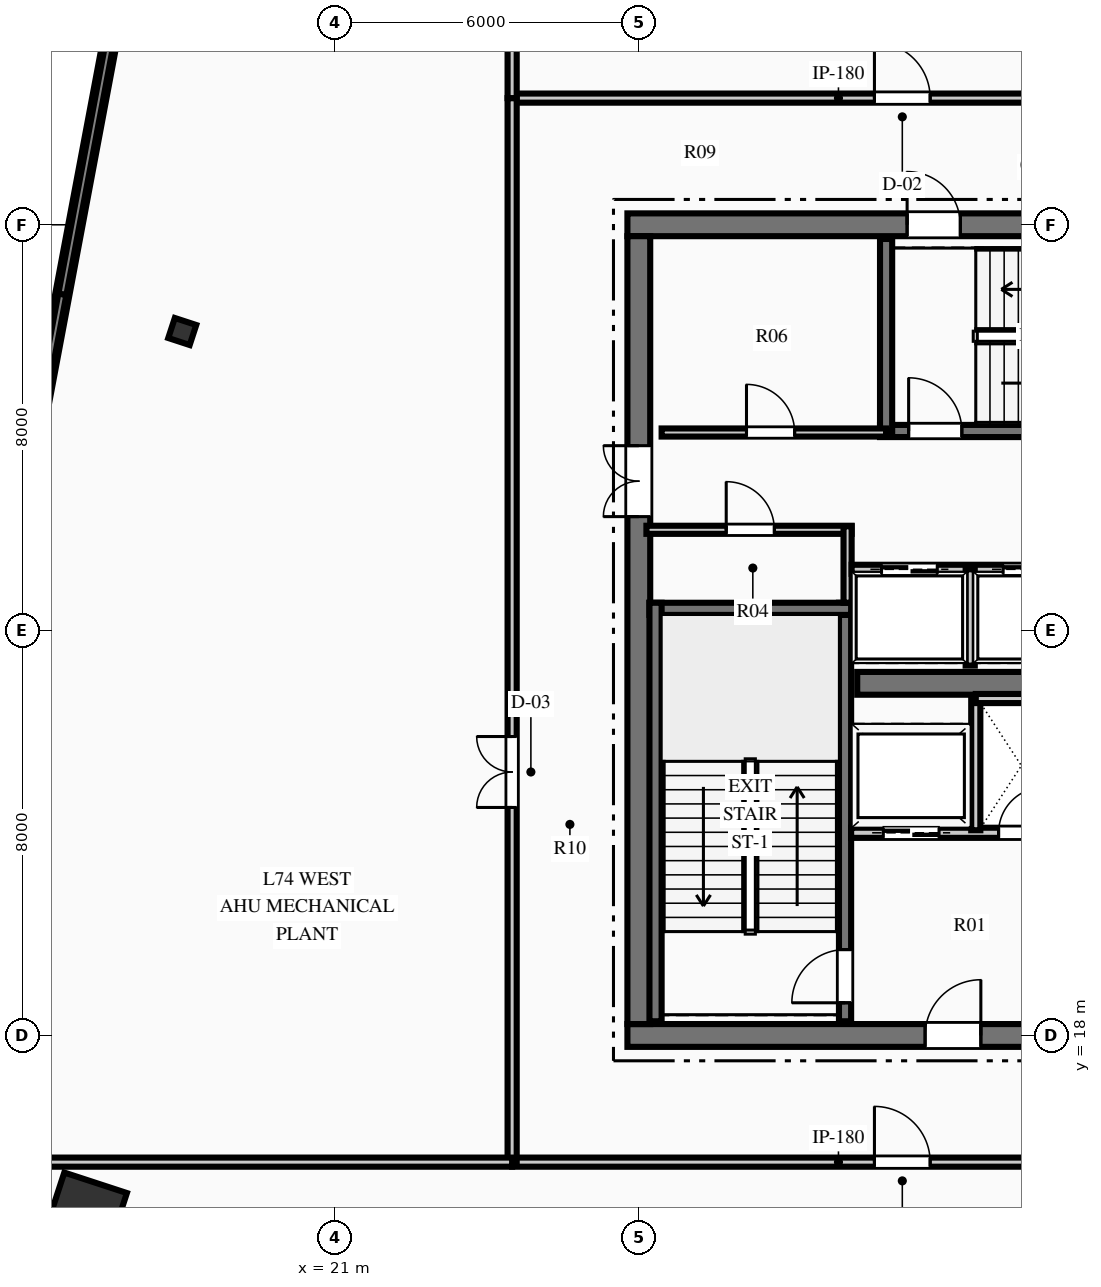
"""IFC4 building model, lengths in metres.
Left out: names, types, materials, properties, quantities, classifications, styles, units other than length and angle.
Written with IfcOpenShell. Run it as: python <this file> out.ifc"""

import sys

from ifc_helpers import new_model, si_unit, direction, frame, frame_2d, origin, origin_2d, place, context, subcontext, project, spatial, rectangle, hollow_rectangle, i_section, extrude, element, fill, save


model = new_model("IFC4")
c1 = context("Model", 3, precision=1e-05, world=origin(), true_north=direction((0.0, 1.0)))
c2 = subcontext(c1, "Body", "Model", "MODEL_VIEW")
j1 = project(units=[si_unit("LENGTHUNIT", "METRE"), si_unit("PLANEANGLEUNIT", "RADIAN")], contexts=[c1])
p1 = place(None, origin())
s1 = spatial("IfcSite", under=j1, at=p1, CompositionType="ELEMENT")
p2 = place(p1, origin())
s2 = spatial("IfcBuilding", under=s1, at=p2, CompositionType="ELEMENT")
p3 = place(p2, frame((0.0, 0.0, 293.7)))
s3 = spatial("IfcBuildingStorey", under=s2, at=p3, CompositionType="ELEMENT", Elevation=293.7)
p4 = place(p3, frame((26.775, 18.0, 0.0), z_axis=(0.0, 0.0, 1.0), x_axis=(1.0, 0.0, 0.0)))
e1 = element("IfcWall", 1, at=p4, inside=s3, PredefinedType="SHEAR", context=c2, shape_type="SweptSolid", body=[
    extrude(rectangle(XDim=18.45, YDim=0.45, at=frame_2d((9.225, 0.0))), origin(), (0.0, 0.0, 1.0), 4.5),
])
p5 = place(p4, frame((5.875, 0.0, 0.0)))
e2 = element("IfcOpeningElement", 2, at=p5, cuts=e1, PredefinedType="OPENING", context=c2, shape_type="SweptSolid", body=[
    extrude(rectangle(XDim=1.1, YDim=2.15, at=frame_2d((0.55, 1.075))), frame((0.0, 0.235, 0.0), z_axis=(0.0, -1.0, 0.0), x_axis=(1.0, 0.0, 0.0)), (0.0, 0.0, 1.0), 0.47),
])
p6 = place(p4, frame((11.475, 0.0, 0.0)))
e3 = element("IfcOpeningElement", 3, at=p6, cuts=e1, PredefinedType="OPENING", context=c2, shape_type="SweptSolid", body=[
    extrude(rectangle(XDim=1.1, YDim=2.15, at=frame_2d((0.55, 1.075))), frame((0.0, 0.235, 0.0), z_axis=(0.0, -1.0, 0.0), x_axis=(1.0, 0.0, 0.0)), (0.0, 0.0, 1.0), 0.47),
])
p7 = place(p3, frame((26.775, 34.0, 0.0), z_axis=(0.0, 0.0, 1.0), x_axis=(1.0, 0.0, 0.0)))
e4 = element("IfcWall", 4, at=p7, inside=s3, PredefinedType="SHEAR", context=c2, shape_type="SweptSolid", body=[
    extrude(rectangle(XDim=18.45, YDim=0.45, at=frame_2d((9.225, 0.0))), origin(), (0.0, 0.0, 1.0), 4.5),
])
p8 = place(p7, frame((5.52, 0.0, 0.0)))
e5 = element("IfcOpeningElement", 5, at=p8, cuts=e4, PredefinedType="OPENING", context=c2, shape_type="SweptSolid", body=[
    extrude(rectangle(XDim=1.05, YDim=2.15, at=frame_2d((0.525, 1.075))), frame((0.0, 0.235, 0.0), z_axis=(0.0, -1.0, 0.0), x_axis=(1.0, 0.0, 0.0)), (0.0, 0.0, 1.0), 0.47),
])
p9 = place(p3, frame((27.0, 18.225, 0.0), z_axis=(0.0, 0.0, 1.0), x_axis=(0.0, 1.0, 0.0)))
e6 = element("IfcWall", 6, at=p9, inside=s3, PredefinedType="SHEAR", context=c2, shape_type="SweptSolid", body=[
    extrude(rectangle(XDim=15.55, YDim=0.45, at=frame_2d((7.775, 0.0))), origin(), (0.0, 0.0, 1.0), 4.5),
])
p10 = place(p9, frame((10.015, 0.0, 0.0)))
e7 = element("IfcOpeningElement", 7, at=p10, cuts=e6, PredefinedType="OPENING", context=c2, shape_type="SweptSolid", body=[
    extrude(rectangle(XDim=1.4, YDim=2.2, at=frame_2d((0.7, 1.1))), frame((0.0, 0.235, 0.0), z_axis=(0.0, -1.0, 0.0), x_axis=(1.0, 0.0, 0.0)), (0.0, 0.0, 1.0), 0.47),
])
p11 = place(p3, frame((31.31, 24.95, 0.0), z_axis=(0.0, 0.0, 1.0), x_axis=(1.0, 0.0, 0.0)))
e8 = element("IfcWall", 8, at=p11, inside=s3, PredefinedType="SHEAR", context=c2, shape_type="SweptSolid", body=[
    extrude(rectangle(XDim=9.38, YDim=0.45, at=frame_2d((4.69, 0.0))), origin(), (0.0, 0.0, 1.0), 4.5),
])
p12 = place(p3, frame((31.07, 18.28, 0.0), z_axis=(0.0, 0.0, 1.0), x_axis=(0.0, 1.0, 0.0)))
e9 = element("IfcWall", 9, at=p12, inside=s3, PredefinedType="SHEAR", context=c2, shape_type="SweptSolid", body=[
    extrude(rectangle(XDim=8.26, YDim=0.24, at=frame_2d((4.13, 0.0))), origin(), (0.0, 0.0, 1.0), 4.5),
])
p13 = place(p12, frame((0.365, 0.0, 0.0)))
e10 = element("IfcOpeningElement", 10, at=p13, cuts=e9, PredefinedType="OPENING", context=c2, shape_type="SweptSolid", body=[
    extrude(rectangle(XDim=1.05, YDim=2.15, at=frame_2d((0.525, 1.075))), frame((0.0, 0.13, 0.0), z_axis=(0.0, -1.0, 0.0), x_axis=(1.0, 0.0, 0.0)), (0.0, 0.0, 1.0), 0.26),
])
p14 = place(p3, frame((27.21, 26.42, 0.0), z_axis=(0.0, 0.0, 1.0), x_axis=(1.0, 0.0, 0.0)))
e11 = element("IfcWall", 11, at=p14, inside=s3, PredefinedType="SHEAR", context=c2, shape_type="SweptSolid", body=[
    extrude(rectangle(XDim=3.98, YDim=0.24, at=frame_2d((1.99, 0.0))), origin(), (0.0, 0.0, 1.0), 4.5),
])
p15 = place(p3, frame((27.33, 18.28, 0.0), z_axis=(0.0, 0.0, 1.0), x_axis=(0.0, 1.0, 0.0)))
e12 = element("IfcWall", 12, at=p15, inside=s3, PredefinedType="SHEAR", context=c2, shape_type="SweptSolid", body=[
    extrude(rectangle(XDim=8.26, YDim=0.24, at=frame_2d((4.13, 0.0))), origin(), (0.0, 0.0, 1.0), 4.5),
])
p16 = place(p3, frame((31.76, 29.93, 0.0), z_axis=(0.0, 0.0, 1.0), x_axis=(1.0, 0.0, 0.0)))
e13 = element("IfcWall", 13, at=p16, inside=s3, PredefinedType="SHEAR", context=c2, shape_type="SweptSolid", body=[
    extrude(rectangle(XDim=8.38, YDim=0.24, at=frame_2d((4.19, 0.0))), origin(), (0.0, 0.0, 1.0), 4.5),
])
p17 = place(p16, frame((0.565, 0.0, 0.0)))
e14 = element("IfcOpeningElement", 14, at=p17, cuts=e13, PredefinedType="OPENING", context=c2, shape_type="SweptSolid", body=[
    extrude(rectangle(XDim=1.05, YDim=2.15, at=frame_2d((0.525, 1.075))), frame((0.0, 0.13, 0.0), z_axis=(0.0, -1.0, 0.0), x_axis=(1.0, 0.0, 0.0)), (0.0, 0.0, 1.0), 0.26),
])
p18 = place(p3, frame((31.88, 29.93, 0.0), z_axis=(0.0, 0.0, 1.0), x_axis=(0.0, 1.0, 0.0)))
e15 = element("IfcWall", 15, at=p18, inside=s3, PredefinedType="SHEAR", context=c2, shape_type="SweptSolid", body=[
    extrude(rectangle(XDim=3.79, YDim=0.24, at=frame_2d((1.895, 0.0))), origin(), (0.0, 0.0, 1.0), 4.5),
])
p19 = place(p3, frame((16.077, 14.475, 0.0), z_axis=(0.0, 0.0, 1.0), x_axis=(0.311008203279, 0.950407227189, 0.0)))
e16 = element("IfcColumn", 16, at=p19, inside=s3, PredefinedType="COLUMN", context=c2, shape_type="SweptSolid", body=[
    extrude(hollow_rectangle(XDim=1.3, YDim=1.3, WallThickness=0.06, at=origin_2d()), origin(), (0.0, 0.0, 1.0), 4.5),
])
p20 = place(p3, frame((17.99, 31.894, 0.0), z_axis=(0.0, 0.0, 1.0), x_axis=(0.311008203279, 0.950407227189, 0.0)))
e17 = element("IfcColumn", 17, at=p20, inside=s3, PredefinedType="COLUMN", context=c2, shape_type="SweptSolid", body=[
    extrude(i_section(OverallWidth=0.416, OverallDepth=0.445, WebThickness=0.039, FlangeThickness=0.063, at=origin_2d()), origin(), (0.0, 0.0, 1.0), 4.5),
])
p21 = place(p3, frame((15.116, 29.927, 0.0), z_axis=(0.0, 0.0, 1.0), x_axis=(0.184798495251, 0.982776432437, 0.0)))
e18 = element("IfcWall", 18, at=p21, inside=s3, PredefinedType="STANDARD", context=c2, shape_type="SweptSolid", body=[
    extrude(rectangle(XDim=19.25, YDim=0.28, at=frame_2d((9.625, 0.0))), origin(), (0.0, 0.0, 1.0), 1.15),
])
p22 = place(p3, frame((31.19, 22.0, 0.0), z_axis=(0.0, 0.0, 1.0), x_axis=(1.0, 0.0, 0.0)))
e19 = element("IfcWall", 19, at=p22, inside=s3, PredefinedType="PARTITIONING", context=c2, shape_type="SweptSolid", body=[
    extrude(rectangle(XDim=4.69, YDim=0.2, at=frame_2d((2.345, 0.0))), origin(), (0.0, 0.0, 1.0), 4.1),
])
p23 = place(p22, frame((2.91, 0.0, 0.0)))
e20 = element("IfcOpeningElement", 20, at=p23, cuts=e19, PredefinedType="OPENING", context=c2, shape_type="SweptSolid", body=[
    extrude(rectangle(XDim=0.9, YDim=2.15, at=frame_2d((0.45, 1.075))), frame((0.0, 0.11, 0.0), z_axis=(0.0, -1.0, 0.0), x_axis=(1.0, 0.0, 0.0)), (0.0, 0.0, 1.0), 0.22),
])
p24 = place(p22, frame((0.635, 0.0, 0.0)))
e21 = element("IfcOpeningElement", 21, at=p24, cuts=e19, PredefinedType="OPENING", context=c2, shape_type="SweptSolid", body=[
    extrude(rectangle(XDim=1.1, YDim=2.15, at=frame_2d((0.55, 1.075))), frame((0.0, 0.11, 0.0), z_axis=(0.0, -1.0, 0.0), x_axis=(1.0, 0.0, 0.0)), (0.0, 0.0, 1.0), 0.22),
])
p25 = place(p3, frame((33.65, 22.05, 0.0), z_axis=(0.0, 0.0, 1.0), x_axis=(0.0, 1.0, 0.0)))
e22 = element("IfcWall", 22, at=p25, inside=s3, PredefinedType="PARTITIONING", context=c2, shape_type="SweptSolid", body=[
    extrude(rectangle(XDim=2.6, YDim=0.18, at=frame_2d((1.3, 0.0))), origin(), (0.0, 0.0, 1.0), 4.1),
])
p26 = place(p3, frame((33.65, 24.65, 0.0), z_axis=(0.0, 0.0, 1.0), x_axis=(1.0, 0.0, 0.0)))
e23 = element("IfcWall", 23, at=p26, inside=s3, PredefinedType="PARTITIONING", context=c2, shape_type="SweptSolid", body=[
    extrude(rectangle(XDim=1.8, YDim=0.18, at=frame_2d((0.9, 0.0))), origin(), (0.0, 0.0, 1.0), 4.1),
])
p27 = place(p3, frame((27.15, 27.98, 0.0), z_axis=(0.0, 0.0, 1.0), x_axis=(1.0, 0.0, 0.0)))
e24 = element("IfcWall", 24, at=p27, inside=s3, PredefinedType="PARTITIONING", context=c2, shape_type="SweptSolid", body=[
    extrude(rectangle(XDim=4.05, YDim=0.16, at=frame_2d((2.025, 0.0))), origin(), (0.0, 0.0, 1.0), 4.1),
])
p28 = place(p27, frame((1.575, 0.0, 0.0)))
e25 = element("IfcOpeningElement", 25, at=p28, cuts=e24, PredefinedType="OPENING", context=c2, shape_type="SweptSolid", body=[
    extrude(rectangle(XDim=0.95, YDim=2.15, at=frame_2d((0.475, 1.075))), frame((0.0, 0.09, 0.0), z_axis=(0.0, -1.0, 0.0), x_axis=(1.0, 0.0, 0.0)), (0.0, 0.0, 1.0), 0.18),
])
p29 = place(p3, frame((31.12, 26.54, 0.0), z_axis=(0.0, 0.0, 1.0), x_axis=(0.0, 1.0, 0.0)))
e26 = element("IfcWall", 26, at=p29, inside=s3, PredefinedType="PARTITIONING", context=c2, shape_type="SweptSolid", body=[
    extrude(rectangle(XDim=1.51, YDim=0.16, at=frame_2d((0.755, 0.0))), origin(), (0.0, 0.0, 1.0), 4.1),
])
p30 = place(p3, frame((27.45, 29.9, 0.0), z_axis=(0.0, 0.0, 1.0), x_axis=(1.0, 0.0, 0.0)))
e27 = element("IfcWall", 27, at=p30, inside=s3, PredefinedType="PARTITIONING", context=c2, shape_type="SweptSolid", body=[
    extrude(rectangle(XDim=4.43, YDim=0.16, at=frame_2d((2.215, 0.0))), origin(), (0.0, 0.0, 1.0), 4.1),
])
p31 = place(p30, frame((1.675, 0.0, 0.0)))
e28 = element("IfcOpeningElement", 28, at=p31, cuts=e27, PredefinedType="OPENING", context=c2, shape_type="SweptSolid", body=[
    extrude(rectangle(XDim=0.95, YDim=2.15, at=frame_2d((0.475, 1.075))), frame((0.0, 0.09, 0.0), z_axis=(0.0, -1.0, 0.0), x_axis=(1.0, 0.0, 0.0)), (0.0, 0.0, 1.0), 0.18),
])
p32 = place(p3, frame((31.2, 27.2, 0.0), z_axis=(0.0, 0.0, 1.0), x_axis=(1.0, 0.0, 0.0)))
e29 = element("IfcWall", 29, at=p32, inside=s3, PredefinedType="PARTITIONING", context=c2, shape_type="SweptSolid", body=[
    extrude(rectangle(XDim=9.6, YDim=0.18, at=frame_2d((4.8, 0.0))), origin(), (0.0, 0.0, 1.0), 4.1),
])
p33 = place(p32, frame((0.59, 0.0, 0.0)))
e30 = element("IfcOpeningElement", 30, at=p33, cuts=e29, PredefinedType="OPENING", context=c2, shape_type="SweptSolid", body=[
    extrude(rectangle(XDim=1.1, YDim=2.15, at=frame_2d((0.55, 1.075))), frame((0.0, 0.1, 0.0), z_axis=(0.0, -1.0, 0.0), x_axis=(1.0, 0.0, 0.0)), (0.0, 0.0, 1.0), 0.2),
])
p34 = place(p32, frame((2.99, 0.0, 0.0)))
e31 = element("IfcOpeningElement", 31, at=p34, cuts=e29, PredefinedType="OPENING", context=c2, shape_type="SweptSolid", body=[
    extrude(rectangle(XDim=1.1, YDim=2.15, at=frame_2d((0.55, 1.075))), frame((0.0, 0.1, 0.0), z_axis=(0.0, -1.0, 0.0), x_axis=(1.0, 0.0, 0.0)), (0.0, 0.0, 1.0), 0.2),
])
p35 = place(p32, frame((5.51, 0.0, 0.0)))
e32 = element("IfcOpeningElement", 32, at=p35, cuts=e29, PredefinedType="OPENING", context=c2, shape_type="SweptSolid", body=[
    extrude(rectangle(XDim=1.1, YDim=2.15, at=frame_2d((0.55, 1.075))), frame((0.0, 0.1, 0.0), z_axis=(0.0, -1.0, 0.0), x_axis=(1.0, 0.0, 0.0)), (0.0, 0.0, 1.0), 0.2),
])
p36 = place(p32, frame((7.91, 0.0, 0.0)))
e33 = element("IfcOpeningElement", 33, at=p36, cuts=e29, PredefinedType="OPENING", context=c2, shape_type="SweptSolid", body=[
    extrude(rectangle(XDim=1.1, YDim=2.15, at=frame_2d((0.55, 1.075))), frame((0.0, 0.1, 0.0), z_axis=(0.0, -1.0, 0.0), x_axis=(1.0, 0.0, 0.0)), (0.0, 0.0, 1.0), 0.2),
])
p37 = place(p3, frame((33.54, 25.3, 0.0), z_axis=(0.0, 0.0, 1.0), x_axis=(0.0, 1.0, 0.0)))
e34 = element("IfcWall", 34, at=p37, inside=s3, PredefinedType="PARTITIONING", context=c2, shape_type="SweptSolid", body=[
    extrude(rectangle(XDim=1.9, YDim=0.18, at=frame_2d((0.95, 0.0))), origin(), (0.0, 0.0, 1.0), 4.1),
])
p38 = place(p3, frame((24.5, 15.5, 0.0), z_axis=(0.0, 0.0, 1.0), x_axis=(1.0, 0.0, 0.0)))
e35 = element("IfcWall", 35, at=p38, inside=s3, PredefinedType="PARTITIONING", context=c2, shape_type="SweptSolid", body=[
    extrude(rectangle(XDim=23.0, YDim=0.18, at=frame_2d((11.5, 0.0))), origin(), (0.0, 0.0, 1.0), 4.1),
])
p39 = place(p38, frame((7.15, 0.0, 0.0)))
e36 = element("IfcOpeningElement", 36, at=p39, cuts=e35, PredefinedType="OPENING", context=c2, shape_type="SweptSolid", body=[
    extrude(rectangle(XDim=1.1, YDim=2.15, at=frame_2d((0.55, 1.075))), frame((0.0, 0.1, 0.0), z_axis=(0.0, -1.0, 0.0), x_axis=(1.0, 0.0, 0.0)), (0.0, 0.0, 1.0), 0.2),
])
p40 = place(p38, frame((14.75, 0.0, 0.0)))
e37 = element("IfcOpeningElement", 37, at=p40, cuts=e35, PredefinedType="OPENING", context=c2, shape_type="SweptSolid", body=[
    extrude(rectangle(XDim=1.1, YDim=2.15, at=frame_2d((0.55, 1.075))), frame((0.0, 0.1, 0.0), z_axis=(0.0, -1.0, 0.0), x_axis=(1.0, 0.0, 0.0)), (0.0, 0.0, 1.0), 0.2),
])
p41 = place(p3, frame((24.5, 36.5, 0.0), z_axis=(0.0, 0.0, 1.0), x_axis=(1.0, 0.0, 0.0)))
e38 = element("IfcWall", 38, at=p41, inside=s3, PredefinedType="PARTITIONING", context=c2, shape_type="SweptSolid", body=[
    extrude(rectangle(XDim=23.0, YDim=0.18, at=frame_2d((11.5, 0.0))), origin(), (0.0, 0.0, 1.0), 4.1),
])
p42 = place(p41, frame((7.15, 0.0, 0.0)))
e39 = element("IfcOpeningElement", 39, at=p42, cuts=e38, PredefinedType="OPENING", context=c2, shape_type="SweptSolid", body=[
    extrude(rectangle(XDim=1.1, YDim=2.15, at=frame_2d((0.55, 1.075))), frame((0.0, 0.1, 0.0), z_axis=(0.0, -1.0, 0.0), x_axis=(1.0, 0.0, 0.0)), (0.0, 0.0, 1.0), 0.2),
])
p43 = place(p41, frame((14.75, 0.0, 0.0)))
e40 = element("IfcOpeningElement", 40, at=p43, cuts=e38, PredefinedType="OPENING", context=c2, shape_type="SweptSolid", body=[
    extrude(rectangle(XDim=1.1, YDim=2.15, at=frame_2d((0.55, 1.075))), frame((0.0, 0.1, 0.0), z_axis=(0.0, -1.0, 0.0), x_axis=(1.0, 0.0, 0.0)), (0.0, 0.0, 1.0), 0.2),
])
p44 = place(p3, frame((24.5, 15.5, 0.0), z_axis=(0.0, 0.0, 1.0), x_axis=(0.0, 1.0, 0.0)))
e41 = element("IfcWall", 41, at=p44, inside=s3, PredefinedType="PARTITIONING", context=c2, shape_type="SweptSolid", body=[
    extrude(rectangle(XDim=21.0, YDim=0.18, at=frame_2d((10.5, 0.0))), origin(), (0.0, 0.0, 1.0), 4.1),
])
p45 = place(p44, frame((7.0, 0.0, 0.0)))
e42 = element("IfcOpeningElement", 42, at=p45, cuts=e41, PredefinedType="OPENING", context=c2, shape_type="SweptSolid", body=[
    extrude(rectangle(XDim=1.4, YDim=2.2, at=frame_2d((0.7, 1.1))), frame((0.0, 0.1, 0.0), z_axis=(0.0, -1.0, 0.0), x_axis=(1.0, 0.0, 0.0)), (0.0, 0.0, 1.0), 0.2),
])
p46 = place(p3, frame((12.444, 15.5, 0.0), z_axis=(0.0, 0.0, 1.0), x_axis=(1.0, 0.0, 0.0)))
e43 = element("IfcWall", 43, at=p46, inside=s3, PredefinedType="PARTITIONING", context=c2, shape_type="SweptSolid", body=[
    extrude(rectangle(XDim=12.056, YDim=0.18, at=frame_2d((6.028, 0.0))), origin(), (0.0, 0.0, 1.0), 3.689),
])
p47 = place(p3, frame((24.5, 36.5, 0.0), z_axis=(0.0, 0.0, 1.0), x_axis=(0.0, 1.0, 0.0)))
e44 = element("IfcWall", 44, at=p47, inside=s3, PredefinedType="PARTITIONING", context=c2, shape_type="SweptSolid", body=[
    extrude(rectangle(XDim=15.076, YDim=0.18, at=frame_2d((7.538, 0.0))), origin(), (0.0, 0.0, 1.0), 4.1),
])
p48 = place(p28, origin())
e45 = element("IfcDoor", 45, at=p48, inside=s3, OperationType="SINGLE_SWING_LEFT", PredefinedType="DOOR", context=c2, shape_type="SweptSolid", body=[
    extrude(rectangle(XDim=0.95, YDim=2.15, at=frame_2d((0.475, 1.075))), frame((0.0, 0.025, 0.0), z_axis=(0.0, -1.0, 0.0), x_axis=(1.0, 0.0, 0.0)), (0.0, 0.0, 1.0), 0.05),
])
fill(e25, e45)
p49 = place(p31, origin())
e46 = element("IfcDoor", 46, at=p49, inside=s3, OperationType="SINGLE_SWING_LEFT", PredefinedType="DOOR", context=c2, shape_type="SweptSolid", body=[
    extrude(rectangle(XDim=0.95, YDim=2.15, at=frame_2d((0.475, 1.075))), frame((0.0, 0.025, 0.0), z_axis=(0.0, -1.0, 0.0), x_axis=(1.0, 0.0, 0.0)), (0.0, 0.0, 1.0), 0.05),
])
fill(e28, e46)
p50 = place(p13, origin())
e47 = element("IfcDoor", 47, at=p50, inside=s3, OperationType="SINGLE_SWING_LEFT", PredefinedType="DOOR", context=c2, shape_type="SweptSolid", body=[
    extrude(rectangle(XDim=1.05, YDim=2.15, at=frame_2d((0.525, 1.075))), frame((0.0, 0.025, 0.0), z_axis=(0.0, -1.0, 0.0), x_axis=(1.0, 0.0, 0.0)), (0.0, 0.0, 1.0), 0.05),
])
fill(e10, e47)
p51 = place(p17, origin())
e48 = element("IfcDoor", 48, at=p51, inside=s3, OperationType="SINGLE_SWING_LEFT", PredefinedType="DOOR", context=c2, shape_type="SweptSolid", body=[
    extrude(rectangle(XDim=1.05, YDim=2.15, at=frame_2d((0.525, 1.075))), frame((0.0, 0.025, 0.0), z_axis=(0.0, -1.0, 0.0), x_axis=(1.0, 0.0, 0.0)), (0.0, 0.0, 1.0), 0.05),
])
fill(e14, e48)
p52 = place(p5, origin())
e49 = element("IfcDoor", 49, at=p52, inside=s3, OperationType="SINGLE_SWING_RIGHT", PredefinedType="DOOR", context=c2, shape_type="SweptSolid", body=[
    extrude(rectangle(XDim=1.1, YDim=2.15, at=frame_2d((0.55, 1.075))), frame((0.0, 0.025, 0.0), z_axis=(0.0, -1.0, 0.0), x_axis=(1.0, 0.0, 0.0)), (0.0, 0.0, 1.0), 0.05),
])
fill(e2, e49)
p53 = place(p23, origin())
e50 = element("IfcDoor", 50, at=p53, inside=s3, OperationType="SINGLE_SWING_RIGHT", PredefinedType="DOOR", context=c2, shape_type="SweptSolid", body=[
    extrude(rectangle(XDim=0.9, YDim=2.15, at=frame_2d((0.45, 1.075))), frame((0.0, 0.025, 0.0), z_axis=(0.0, -1.0, 0.0), x_axis=(1.0, 0.0, 0.0)), (0.0, 0.0, 1.0), 0.05),
])
fill(e20, e50)
p54 = place(p10, origin())
e51 = element("IfcDoor", 51, at=p54, inside=s3, OperationType="DOUBLE_DOOR_SINGLE_SWING", PredefinedType="DOOR", context=c2, shape_type="SweptSolid", body=[
    extrude(rectangle(XDim=1.4, YDim=2.2, at=frame_2d((0.7, 1.1))), frame((0.0, 0.025, 0.0), z_axis=(0.0, -1.0, 0.0), x_axis=(1.0, 0.0, 0.0)), (0.0, 0.0, 1.0), 0.05),
])
fill(e7, e51)
p55 = place(p39, origin())
e52 = element("IfcDoor", 52, at=p55, inside=s3, OperationType="SINGLE_SWING_LEFT", PredefinedType="DOOR", context=c2, shape_type="SweptSolid", body=[
    extrude(rectangle(XDim=1.1, YDim=2.15, at=frame_2d((0.55, 1.075))), frame((0.0, 0.025, 0.0), z_axis=(0.0, -1.0, 0.0), x_axis=(1.0, 0.0, 0.0)), (0.0, 0.0, 1.0), 0.05),
])
fill(e36, e52)
p56 = place(p45, origin())
e53 = element("IfcDoor", 53, at=p56, inside=s3, OperationType="DOUBLE_DOOR_SINGLE_SWING", PredefinedType="DOOR", context=c2, shape_type="SweptSolid", body=[
    extrude(rectangle(XDim=1.4, YDim=2.2, at=frame_2d((0.7, 1.1))), frame((0.0, 0.025, 0.0), z_axis=(0.0, -1.0, 0.0), x_axis=(1.0, 0.0, 0.0)), (0.0, 0.0, 1.0), 0.05),
])
fill(e42, e53)
p57 = place(p42, origin())
e54 = element("IfcDoor", 54, at=p57, inside=s3, OperationType="SINGLE_SWING_LEFT", PredefinedType="DOOR", context=c2, shape_type="SweptSolid", body=[
    extrude(rectangle(XDim=1.1, YDim=2.15, at=frame_2d((0.55, 1.075))), frame((0.0, 0.025, 0.0), z_axis=(0.0, -1.0, 0.0), x_axis=(1.0, 0.0, 0.0)), (0.0, 0.0, 1.0), 0.05),
])
fill(e39, e54)
p58 = place(p8, origin())
e55 = element("IfcDoor", 55, at=p58, inside=s3, OperationType="SINGLE_SWING_LEFT", PredefinedType="DOOR", context=c2, shape_type="SweptSolid", body=[
    extrude(rectangle(XDim=1.05, YDim=2.15, at=frame_2d((0.525, 1.075))), frame((0.0, 0.025, 0.0), z_axis=(0.0, -1.0, 0.0), x_axis=(1.0, 0.0, 0.0)), (0.0, 0.0, 1.0), 0.05),
])
fill(e5, e55)
p59 = place(p33, origin())
e56 = element("IfcDoor", 56, at=p59, inside=s3, OperationType="SLIDING_TO_LEFT", PredefinedType="DOOR", context=c2, shape_type="SweptSolid", body=[
    extrude(rectangle(XDim=1.1, YDim=2.15, at=frame_2d((0.55, 1.075))), frame((0.0, 0.025, 0.0), z_axis=(0.0, -1.0, 0.0), x_axis=(1.0, 0.0, 0.0)), (0.0, 0.0, 1.0), 0.05),
])
fill(e30, e56)
p60 = place(p34, origin())
e57 = element("IfcDoor", 57, at=p60, inside=s3, OperationType="SLIDING_TO_LEFT", PredefinedType="DOOR", context=c2, shape_type="SweptSolid", body=[
    extrude(rectangle(XDim=1.1, YDim=2.15, at=frame_2d((0.55, 1.075))), frame((0.0, 0.025, 0.0), z_axis=(0.0, -1.0, 0.0), x_axis=(1.0, 0.0, 0.0)), (0.0, 0.0, 1.0), 0.05),
])
fill(e31, e57)
p61 = place(p24, origin())
e58 = element("IfcDoor", 58, at=p61, inside=s3, OperationType="SLIDING_TO_LEFT", PredefinedType="DOOR", context=c2, shape_type="SweptSolid", body=[
    extrude(rectangle(XDim=1.1, YDim=2.15, at=frame_2d((0.55, 1.075))), frame((0.0, 0.025, 0.0), z_axis=(0.0, -1.0, 0.0), x_axis=(1.0, 0.0, 0.0)), (0.0, 0.0, 1.0), 0.05),
])
fill(e21, e58)
save(model, sys.argv[1])
